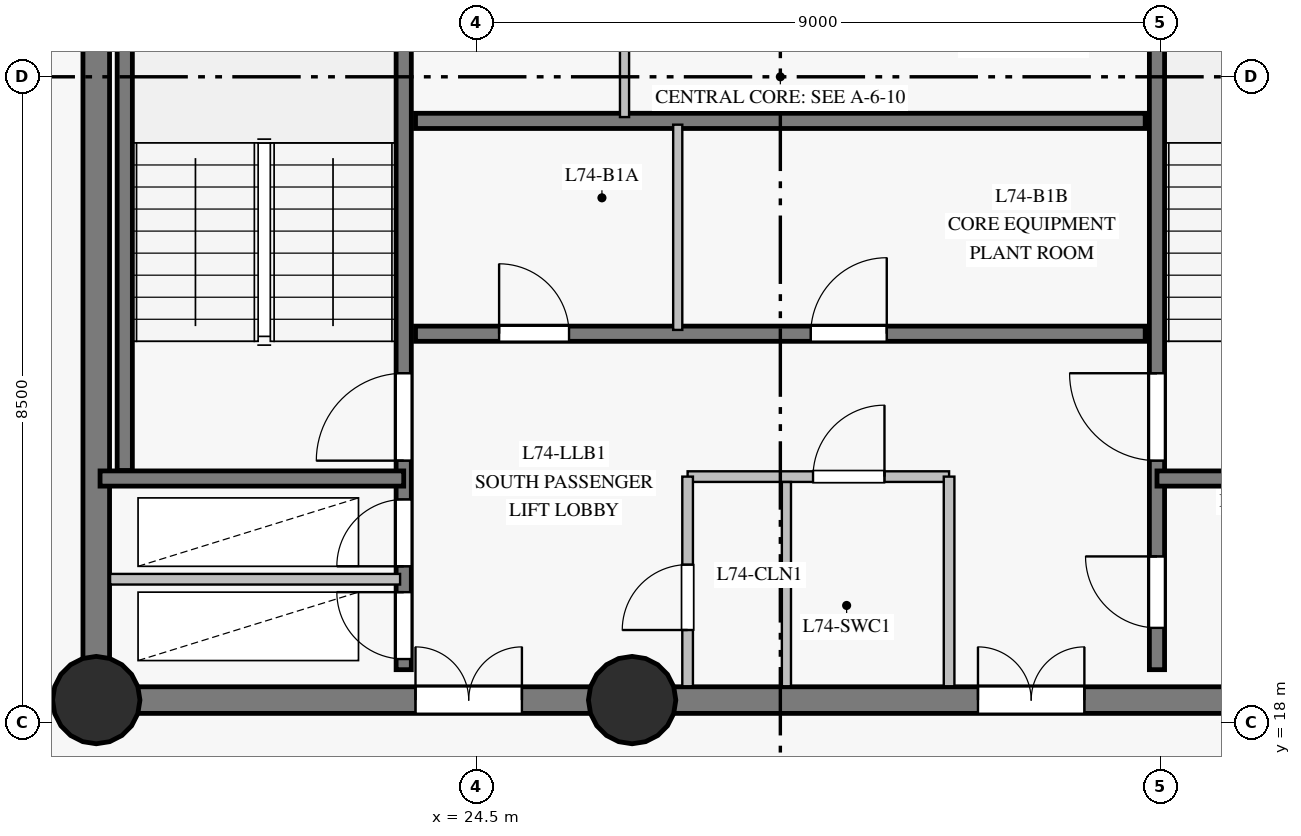
"""IFC4 building model, lengths in metres.
Left out: names, types, materials, properties, quantities, classifications, styles, units other than length and angle.
Written with IfcOpenShell. Run it as: python <this file> out.ifc"""

import sys

from ifc_helpers import new_model, si_unit, direction, frame, frame_2d, origin, origin_with_axes, origin_2d, place, context, subcontext, project, spatial, rectangle, circle, extrude, source, transform, mapped, element, fill, save


model = new_model("IFC4")
c1 = context("Model", 3, precision=1e-05, world=origin(), true_north=direction((0.0, 1.0)))
c2 = subcontext(c1, "Body", "Model", "MODEL_VIEW")
j1 = project(units=[si_unit("LENGTHUNIT", "METRE"), si_unit("PLANEANGLEUNIT", "RADIAN")], contexts=[c1])
p1 = place(None, origin())
s1 = spatial("IfcSite", under=j1, at=p1, CompositionType="ELEMENT")
p2 = place(p1, origin())
s2 = spatial("IfcBuilding", under=s1, at=p2, CompositionType="ELEMENT")
p3 = place(p2, frame((0.0, 0.0, 250.45)))
s3 = spatial("IfcBuildingStorey", under=s2, at=p3, CompositionType="ELEMENT", Elevation=250.45)
p4 = place(p3, frame((19.5, 18.3, 0.0), z_axis=(0.0, 0.0, 1.0), x_axis=(1.0, 0.0, 0.0)))
e1 = element("IfcWall", 1, at=p4, inside=s3, PredefinedType="SHEAR", context=c2, shape_type="SweptSolid", body=[
    extrude(rectangle(XDim=7.05, YDim=0.35, at=frame_2d((3.525, 0.0))), origin(), (0.0, 0.0, 1.0), 2.85),
])
p5 = place(p4, frame((4.2, 0.0, 0.0)))
e2 = element("IfcOpeningElement", 2, at=p5, cuts=e1, PredefinedType="OPENING", context=c2, shape_type="SweptSolid", body=[
    extrude(rectangle(XDim=1.4, YDim=2.2, at=frame_2d((0.7, 1.1))), frame((0.0, 0.185, 0.0), z_axis=(0.0, -1.0, 0.0), x_axis=(1.0, 0.0, 0.0)), (0.0, 0.0, 1.0), 0.37),
])
p6 = place(p3, frame((26.55, 18.3, 0.0), z_axis=(0.0, 0.0, 1.0), x_axis=(1.0, 0.0, 0.0)))
e3 = element("IfcWall", 3, at=p6, inside=s3, PredefinedType="SHEAR", context=c2, shape_type="SweptSolid", body=[
    extrude(rectangle(XDim=10.95, YDim=0.35, at=frame_2d((5.475, 0.0))), origin(), (0.0, 0.0, 1.0), 2.85),
])
p7 = place(p6, frame((4.55, 0.0, 0.0)))
e4 = element("IfcOpeningElement", 4, at=p7, cuts=e3, PredefinedType="OPENING", context=c2, shape_type="SweptSolid", body=[
    extrude(rectangle(XDim=1.4, YDim=2.2, at=frame_2d((0.7, 1.1))), frame((0.0, 0.185, 0.0), z_axis=(0.0, -1.0, 0.0), x_axis=(1.0, 0.0, 0.0)), (0.0, 0.0, 1.0), 0.37),
])
p8 = place(p3, frame((19.5, 34.7, 0.0), z_axis=(0.0, 0.0, 1.0), x_axis=(0.0, -1.0, 0.0)))
e5 = element("IfcWall", 5, at=p8, inside=s3, PredefinedType="SHEAR", context=c2, shape_type="SweptSolid", body=[
    extrude(rectangle(XDim=16.4, YDim=0.35, at=frame_2d((8.2, 0.0))), origin(), (0.0, 0.0, 1.0), 2.85),
])
p9 = place(p8, frame((3.24, 0.0, 0.0)))
e6 = element("IfcOpeningElement", 6, at=p9, cuts=e5, PredefinedType="OPENING", context=c2, shape_type="SweptSolid", body=[
    extrude(rectangle(XDim=1.1, YDim=2.15, at=frame_2d((0.55, 1.075))), frame((0.0, 0.185, 0.0), z_axis=(0.0, -1.0, 0.0), x_axis=(1.0, 0.0, 0.0)), (0.0, 0.0, 1.0), 0.37),
])
m1 = source(origin_with_axes(), c2, "Body", "SweptSolid", [
    extrude(circle(Radius=0.575, at=origin_2d()), origin(), (0.0, 0.0, 1.0), 3.05),
])
for number, where, z_axis, x_axis in (
    (7, (19.5, 18.3, 0.0), (0.0, 0.0, 1.0), (1.0, 0.0, 0.0)),
    (8, (26.55, 18.3, 0.0), (0.0, 0.0, 1.0), (1.0, 0.0, 0.0)),
):
    element("IfcColumn", number, at=place(p3, frame(where, z_axis=z_axis, x_axis=x_axis)), inside=s3, PredefinedType="COLUMN", context=c2, shape_type="MappedRepresentation", body=[
        mapped(m1, transform((0.0, 0.0, 0.0), scale=1.0)),
    ])
p10 = place(p3, frame((23.545, 18.7, 0.0), z_axis=(0.0, 0.0, 1.0), x_axis=(0.0, 1.0, 0.0)))
e9 = element("IfcWall", 9, at=p10, inside=s3, PredefinedType="SHEAR", context=c2, shape_type="SweptSolid", body=[
    extrude(rectangle(XDim=15.6, YDim=0.2, at=frame_2d((7.8, 0.0))), origin(), (0.0, 0.0, 1.0), 2.85),
])
p11 = place(p10, frame((2.75, 0.0, 0.0)))
e10 = element("IfcOpeningElement", 10, at=p11, cuts=e9, PredefinedType="OPENING", context=c2, shape_type="SweptSolid", body=[
    extrude(rectangle(XDim=1.15, YDim=2.15, at=frame_2d((0.575, 1.075))), frame((0.0, 0.11, 0.0), z_axis=(0.0, -1.0, 0.0), x_axis=(1.0, 0.0, 0.0)), (0.0, 0.0, 1.0), 0.22),
])
p12 = place(p10, frame((0.14, 0.0, 0.0)))
e11 = element("IfcOpeningElement", 11, at=p12, cuts=e9, PredefinedType="OPENING", context=c2, shape_type="SweptSolid", body=[
    extrude(rectangle(XDim=0.88, YDim=2.1, at=frame_2d((0.44, 1.05))), frame((0.0, 0.11, 0.0), z_axis=(0.0, -1.0, 0.0), x_axis=(1.0, 0.0, 0.0)), (0.0, 0.0, 1.0), 0.22),
])
p13 = place(p10, frame((1.36, 0.0, 0.0)))
e12 = element("IfcOpeningElement", 12, at=p13, cuts=e9, PredefinedType="OPENING", context=c2, shape_type="SweptSolid", body=[
    extrude(rectangle(XDim=0.88, YDim=2.1, at=frame_2d((0.44, 1.05))), frame((0.0, 0.11, 0.0), z_axis=(0.0, -1.0, 0.0), x_axis=(1.0, 0.0, 0.0)), (0.0, 0.0, 1.0), 0.22),
])
p14 = place(p10, frame((12.1, 0.0, 0.0)))
e13 = element("IfcOpeningElement", 13, at=p14, cuts=e9, PredefinedType="OPENING", context=c2, shape_type="SweptSolid", body=[
    extrude(rectangle(XDim=1.12, YDim=2.15, at=frame_2d((0.56, 1.075))), frame((0.0, 0.11, 0.0), z_axis=(0.0, -1.0, 0.0), x_axis=(1.0, 0.0, 0.0)), (0.0, 0.0, 1.0), 0.22),
])
p15 = place(p10, frame((14.05, 0.0, 0.0)))
e14 = element("IfcOpeningElement", 14, at=p15, cuts=e9, PredefinedType="OPENING", context=c2, shape_type="SweptSolid", body=[
    extrude(rectangle(XDim=1.12, YDim=2.15, at=frame_2d((0.56, 1.075))), frame((0.0, 0.11, 0.0), z_axis=(0.0, -1.0, 0.0), x_axis=(1.0, 0.0, 0.0)), (0.0, 0.0, 1.0), 0.22),
])
p16 = place(p3, frame((33.455, 18.7, 0.0), z_axis=(0.0, 0.0, 1.0), x_axis=(0.0, 1.0, 0.0)))
e15 = element("IfcWall", 15, at=p16, inside=s3, PredefinedType="SHEAR", context=c2, shape_type="SweptSolid", body=[
    extrude(rectangle(XDim=15.6, YDim=0.2, at=frame_2d((7.8, 0.0))), origin(), (0.0, 0.0, 1.0), 2.85),
])
p17 = place(p16, frame((2.75, 0.0, 0.0)))
e16 = element("IfcOpeningElement", 16, at=p17, cuts=e15, PredefinedType="OPENING", context=c2, shape_type="SweptSolid", body=[
    extrude(rectangle(XDim=1.15, YDim=2.15, at=frame_2d((0.575, 1.075))), frame((0.0, 0.11, 0.0), z_axis=(0.0, -1.0, 0.0), x_axis=(1.0, 0.0, 0.0)), (0.0, 0.0, 1.0), 0.22),
])
p18 = place(p16, frame((0.55, 0.0, 0.0)))
e17 = element("IfcOpeningElement", 17, at=p18, cuts=e15, PredefinedType="OPENING", context=c2, shape_type="SweptSolid", body=[
    extrude(rectangle(XDim=0.94, YDim=2.1, at=frame_2d((0.47, 1.05))), frame((0.0, 0.11, 0.0), z_axis=(0.0, -1.0, 0.0), x_axis=(1.0, 0.0, 0.0)), (0.0, 0.0, 1.0), 0.22),
])
p19 = place(p3, frame((23.7, 23.12, 0.0), z_axis=(0.0, 0.0, 1.0), x_axis=(1.0, 0.0, 0.0)))
e18 = element("IfcWall", 18, at=p19, inside=s3, PredefinedType="SHEAR", context=c2, shape_type="SweptSolid", body=[
    extrude(rectangle(XDim=9.6, YDim=0.2, at=frame_2d((4.8, 0.0))), origin(), (0.0, 0.0, 1.0), 2.85),
])
p20 = place(p19, frame((1.1, 0.0, 0.0)))
e19 = element("IfcOpeningElement", 19, at=p20, cuts=e18, PredefinedType="OPENING", context=c2, shape_type="SweptSolid", body=[
    extrude(rectangle(XDim=0.92, YDim=2.1, at=frame_2d((0.46, 1.05))), frame((0.0, 0.11, 0.0), z_axis=(0.0, -1.0, 0.0), x_axis=(1.0, 0.0, 0.0)), (0.0, 0.0, 1.0), 0.22),
])
p21 = place(p19, frame((5.2, 0.0, 0.0)))
e20 = element("IfcOpeningElement", 20, at=p21, cuts=e18, PredefinedType="OPENING", context=c2, shape_type="SweptSolid", body=[
    extrude(rectangle(XDim=1.0, YDim=2.15, at=frame_2d((0.5, 1.075))), frame((0.0, 0.11, 0.0), z_axis=(0.0, -1.0, 0.0), x_axis=(1.0, 0.0, 0.0)), (0.0, 0.0, 1.0), 0.22),
])
p22 = place(p3, frame((23.7, 25.92, 0.0), z_axis=(0.0, 0.0, 1.0), x_axis=(1.0, 0.0, 0.0)))
e21 = element("IfcWall", 21, at=p22, inside=s3, PredefinedType="SHEAR", context=c2, shape_type="SweptSolid", body=[
    extrude(rectangle(XDim=9.6, YDim=0.2, at=frame_2d((4.8, 0.0))), origin(), (0.0, 0.0, 1.0), 2.85),
])
p23 = place(p3, frame((19.875, 21.32, 0.0), z_axis=(0.0, 0.0, 1.0), x_axis=(0.0, 1.0, 0.0)))
e22 = element("IfcWall", 22, at=p23, inside=s3, PredefinedType="SHEAR", context=c2, shape_type="SweptSolid", body=[
    extrude(rectangle(XDim=7.5, YDim=0.2, at=frame_2d((3.75, 0.0))), origin(), (0.0, 0.0, 1.0), 2.85),
])
for number, where, z_axis, x_axis in (
    (23, (33.455, 21.215, 0.0), (0.0, 0.0, 1.0), (1.0, 0.0, 0.0)),
    (24, (19.55, 21.215, 0.0), (0.0, 0.0, 1.0), (1.0, 0.0, 0.0)),
):
    element("IfcWall", number, at=place(p3, frame(where, z_axis=z_axis, x_axis=x_axis)), inside=s3, PredefinedType="SHEAR", context=c2, shape_type="SweptSolid", body=[
        extrude(rectangle(XDim=3.995, YDim=0.2, at=frame_2d((1.998, 0.0))), origin(), (0.0, 0.0, 1.0), 2.85),
    ])
p24 = place(p3, frame((19.682, 19.89, 0.0), z_axis=(0.0, 0.0, 1.0), x_axis=(1.0, 0.0, 0.0)))
e25 = element("IfcWall", 25, at=p24, inside=s3, PredefinedType="PARTITIONING", context=c2, shape_type="SweptSolid", body=[
    extrude(rectangle(XDim=3.815, YDim=0.14, at=frame_2d((1.908, 0.0))), origin(), (0.0, 0.0, 1.0), 2.85),
])
p25 = place(p3, frame((27.28, 21.24, 0.0), z_axis=(0.0, 0.0, 1.0), x_axis=(1.0, 0.0, 0.0)))
e26 = element("IfcWall", 26, at=p25, inside=s3, PredefinedType="PARTITIONING", context=c2, shape_type="SweptSolid", body=[
    extrude(rectangle(XDim=3.44, YDim=0.14, at=frame_2d((1.72, 0.0))), origin(), (0.0, 0.0, 1.0), 2.85),
])
p26 = place(p25, frame((1.65, 0.0, 0.0)))
e27 = element("IfcOpeningElement", 27, at=p26, cuts=e26, PredefinedType="OPENING", context=c2, shape_type="SweptSolid", body=[
    extrude(rectangle(XDim=0.94, YDim=2.1, at=frame_2d((0.47, 1.05))), frame((0.0, 0.08, 0.0), z_axis=(0.0, -1.0, 0.0), x_axis=(1.0, 0.0, 0.0)), (0.0, 0.0, 1.0), 0.16),
])
p27 = place(p3, frame((27.15, 23.17, 0.0), z_axis=(0.0, 0.0, 1.0), x_axis=(0.0, 1.0, 0.0)))
e28 = element("IfcWall", 28, at=p27, inside=s3, PredefinedType="PARTITIONING", context=c2, shape_type="SweptSolid", body=[
    extrude(rectangle(XDim=2.7, YDim=0.12, at=frame_2d((1.35, 0.0))), origin(), (0.0, 0.0, 1.0), 2.85),
])
p28 = place(p3, frame((26.45, 25.97, 0.0), z_axis=(0.0, 0.0, 1.0), x_axis=(0.0, 1.0, 0.0)))
e29 = element("IfcWall", 29, at=p28, inside=s3, PredefinedType="PARTITIONING", context=c2, shape_type="SweptSolid", body=[
    extrude(rectangle(XDim=2.7, YDim=0.12, at=frame_2d((1.35, 0.0))), origin(), (0.0, 0.0, 1.0), 2.85),
])
p29 = place(p3, frame((27.28, 18.482, 0.0), z_axis=(0.0, 0.0, 1.0), x_axis=(0.0, 1.0, 0.0)))
e30 = element("IfcWall", 30, at=p29, inside=s3, PredefinedType="PARTITIONING", context=c2, shape_type="SweptSolid", body=[
    extrude(rectangle(XDim=2.758, YDim=0.14, at=frame_2d((1.379, 0.0))), origin(), (0.0, 0.0, 1.0), 2.85),
])
p30 = place(p29, frame((0.74, 0.0, 0.0)))
e31 = element("IfcOpeningElement", 31, at=p30, cuts=e30, PredefinedType="OPENING", context=c2, shape_type="SweptSolid", body=[
    extrude(rectangle(XDim=0.86, YDim=2.1, at=frame_2d((0.43, 1.05))), frame((0.0, 0.08, 0.0), z_axis=(0.0, -1.0, 0.0), x_axis=(1.0, 0.0, 0.0)), (0.0, 0.0, 1.0), 0.16),
])
p31 = place(p3, frame((30.72, 18.482, 0.0), z_axis=(0.0, 0.0, 1.0), x_axis=(0.0, 1.0, 0.0)))
e32 = element("IfcWall", 32, at=p31, inside=s3, PredefinedType="PARTITIONING", context=c2, shape_type="SweptSolid", body=[
    extrude(rectangle(XDim=2.758, YDim=0.14, at=frame_2d((1.379, 0.0))), origin(), (0.0, 0.0, 1.0), 2.85),
])
p32 = place(p3, frame((28.58, 18.482, 0.0), z_axis=(0.0, 0.0, 1.0), x_axis=(0.0, 1.0, 0.0)))
e33 = element("IfcWall", 33, at=p32, inside=s3, PredefinedType="PARTITIONING", context=c2, shape_type="SweptSolid", body=[
    extrude(rectangle(XDim=2.687, YDim=0.12, at=frame_2d((1.344, 0.0))), origin(), (0.0, 0.0, 1.0), 2.85),
])
m2 = source(origin_with_axes(), c2, "Body", "SweptSolid", [
    extrude(rectangle(XDim=1.15, YDim=2.15, at=frame_2d((0.575, 1.075))), frame((0.0, 0.025, 0.0), z_axis=(0.0, -1.0, 0.0), x_axis=(1.0, 0.0, 0.0)), (0.0, 0.0, 1.0), 0.05),
])
p33 = place(p11, origin())
e34 = element("IfcDoor", 34, at=p33, inside=s3, OperationType="SINGLE_SWING_LEFT", PredefinedType="DOOR", context=c2, shape_type="MappedRepresentation", body=[
    mapped(m2, transform((0.0, 0.0, 0.0), scale=1.0)),
])
fill(e10, e34)
p34 = place(p17, origin())
e35 = element("IfcDoor", 35, at=p34, inside=s3, OperationType="SINGLE_SWING_RIGHT", PredefinedType="DOOR", context=c2, shape_type="MappedRepresentation", body=[
    mapped(m2, transform((0.0, 0.0, 0.0), scale=1.0)),
])
fill(e16, e35)
m3 = source(origin_with_axes(), c2, "Body", "SweptSolid", [
    extrude(rectangle(XDim=0.88, YDim=2.1, at=frame_2d((0.44, 1.05))), frame((0.0, 0.025, 0.0), z_axis=(0.0, -1.0, 0.0), x_axis=(1.0, 0.0, 0.0)), (0.0, 0.0, 1.0), 0.05),
])
p35 = place(p12, origin())
e36 = element("IfcDoor", 36, at=p35, inside=s3, OperationType="SINGLE_SWING_RIGHT", PredefinedType="DOOR", context=c2, shape_type="MappedRepresentation", body=[
    mapped(m3, transform((0.0, 0.0, 0.0), scale=1.0)),
])
fill(e11, e36)
p36 = place(p13, origin())
e37 = element("IfcDoor", 37, at=p36, inside=s3, OperationType="SINGLE_SWING_LEFT", PredefinedType="DOOR", context=c2, shape_type="MappedRepresentation", body=[
    mapped(m3, transform((0.0, 0.0, 0.0), scale=1.0)),
])
fill(e12, e37)
m4 = source(origin_with_axes(), c2, "Body", "SweptSolid", [
    extrude(rectangle(XDim=1.4, YDim=2.2, at=frame_2d((0.7, 1.1))), frame((0.0, 0.025, 0.0), z_axis=(0.0, -1.0, 0.0), x_axis=(1.0, 0.0, 0.0)), (0.0, 0.0, 1.0), 0.05),
])
p37 = place(p5, origin())
e38 = element("IfcDoor", 38, at=p37, inside=s3, OperationType="DOUBLE_DOOR_SINGLE_SWING", PredefinedType="DOOR", context=c2, shape_type="MappedRepresentation", body=[
    mapped(m4, transform((0.0, 0.0, 0.0), scale=1.0)),
])
fill(e2, e38)
p38 = place(p7, origin())
e39 = element("IfcDoor", 39, at=p38, inside=s3, OperationType="DOUBLE_DOOR_SINGLE_SWING", PredefinedType="DOOR", context=c2, shape_type="MappedRepresentation", body=[
    mapped(m4, transform((0.0, 0.0, 0.0), scale=1.0)),
])
fill(e4, e39)
m5 = source(origin_with_axes(), c2, "Body", "SweptSolid", [
    extrude(rectangle(XDim=0.94, YDim=2.1, at=frame_2d((0.47, 1.05))), frame((0.0, 0.025, 0.0), z_axis=(0.0, -1.0, 0.0), x_axis=(1.0, 0.0, 0.0)), (0.0, 0.0, 1.0), 0.05),
])
p39 = place(p18, origin())
e40 = element("IfcDoor", 40, at=p39, inside=s3, OperationType="SINGLE_SWING_RIGHT", PredefinedType="DOOR", context=c2, shape_type="MappedRepresentation", body=[
    mapped(m5, transform((0.0, 0.0, 0.0), scale=1.0)),
])
fill(e17, e40)
m6 = source(origin_with_axes(), c2, "Body", "SweptSolid", [
    extrude(rectangle(XDim=0.86, YDim=2.1, at=frame_2d((0.43, 1.05))), frame((0.0, 0.025, 0.0), z_axis=(0.0, -1.0, 0.0), x_axis=(1.0, 0.0, 0.0)), (0.0, 0.0, 1.0), 0.05),
])
p40 = place(p30, origin())
e41 = element("IfcDoor", 41, at=p40, inside=s3, OperationType="SINGLE_SWING_LEFT", PredefinedType="DOOR", context=c2, shape_type="MappedRepresentation", body=[
    mapped(m6, transform((0.0, 0.0, 0.0), scale=1.0)),
])
fill(e31, e41)
p41 = place(p26, origin())
e42 = element("IfcDoor", 42, at=p41, inside=s3, OperationType="SINGLE_SWING_RIGHT", PredefinedType="DOOR", context=c2, shape_type="MappedRepresentation", body=[
    mapped(m5, transform((0.0, 0.0, 0.0), scale=1.0)),
])
fill(e27, e42)
m7 = source(origin_with_axes(), c2, "Body", "SweptSolid", [
    extrude(rectangle(XDim=0.92, YDim=2.1, at=frame_2d((0.46, 1.05))), frame((0.0, 0.025, 0.0), z_axis=(0.0, -1.0, 0.0), x_axis=(1.0, 0.0, 0.0)), (0.0, 0.0, 1.0), 0.05),
])
p42 = place(p20, origin())
e43 = element("IfcDoor", 43, at=p42, inside=s3, OperationType="SINGLE_SWING_LEFT", PredefinedType="DOOR", context=c2, shape_type="MappedRepresentation", body=[
    mapped(m7, transform((0.0, 0.0, 0.0), scale=1.0)),
])
fill(e19, e43)
m8 = source(origin_with_axes(), c2, "Body", "SweptSolid", [
    extrude(rectangle(XDim=1.0, YDim=2.15, at=frame_2d((0.5, 1.075))), frame((0.0, 0.025, 0.0), z_axis=(0.0, -1.0, 0.0), x_axis=(1.0, 0.0, 0.0)), (0.0, 0.0, 1.0), 0.05),
])
p43 = place(p21, origin())
e44 = element("IfcDoor", 44, at=p43, inside=s3, OperationType="SINGLE_SWING_RIGHT", PredefinedType="DOOR", context=c2, shape_type="MappedRepresentation", body=[
    mapped(m8, transform((0.0, 0.0, 0.0), scale=1.0)),
])
fill(e20, e44)
save(model, sys.argv[1])
